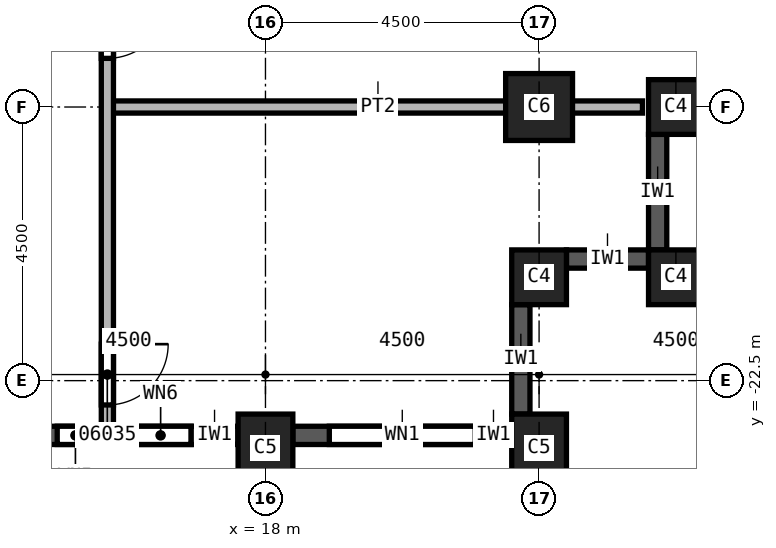
"""IFC4 building model, lengths in metres.
Left out: names, types, materials, properties, quantities, classifications, styles, units other than length and angle.
Written with IfcOpenShell. Run it as: python <this file> out.ifc"""

import sys

from ifc_helpers import new_model, si_unit, direction, frame, frame_2d, origin, origin_2d, place, context, subcontext, project, spatial, rectangle, extrude, element, fill, save


model = new_model("IFC4")
c1 = context("Model", 3, precision=1e-05, world=origin(), true_north=direction((0.0, 1.0)))
c2 = subcontext(c1, "Body", "Model", "MODEL_VIEW")
j1 = project(units=[si_unit("LENGTHUNIT", "METRE"), si_unit("PLANEANGLEUNIT", "RADIAN")], contexts=[c1])
p1 = place(None, origin())
s1 = spatial("IfcSite", under=j1, at=p1, CompositionType="ELEMENT")
p2 = place(p1, origin())
s2 = spatial("IfcBuilding", under=s1, at=p2, CompositionType="ELEMENT")
p3 = place(p2, frame((0.0, 0.0, 126.0)))
s3 = spatial("IfcBuildingStorey", under=s2, at=p3, CompositionType="ELEMENT", Elevation=126.0)
p4 = place(p3, frame((22.5, -18.0, 0.0), z_axis=(0.0, 0.0, 1.0), x_axis=(1.0, 0.0, 0.0)))
e1 = element("IfcColumn", 1, at=p4, inside=s3, PredefinedType="COLUMN", context=c2, shape_type="SweptSolid", body=[
    extrude(rectangle(XDim=1.1, YDim=1.1, at=origin_2d()), origin(), (0.0, 0.0, 1.0), 3.7),
])
for number, where, z_axis, x_axis in (
    (2, (18.0, -23.6, 0.0), (0.0, 0.0, 1.0), (1.0, 0.0, 0.0)),
    (3, (22.5, -23.6, 0.0), (0.0, 0.0, 1.0), (1.0, 0.0, 0.0)),
):
    element("IfcColumn", number, at=place(p3, frame(where, z_axis=z_axis, x_axis=x_axis)), inside=s3, PredefinedType="COLUMN", context=c2, shape_type="SweptSolid", body=[
        extrude(rectangle(XDim=0.9, YDim=1.1, at=origin_2d()), origin(), (0.0, 0.0, 1.0), 3.7),
    ])
for number, where, z_axis, x_axis in (
    (4, (22.5, -20.8, 0.0), (0.0, 0.0, 1.0), (1.0, 0.0, 0.0)),
    (5, (24.75, -20.8, 0.0), (0.0, 0.0, 1.0), (1.0, 0.0, 0.0)),
    (6, (24.75, -18.0, 0.0), (0.0, 0.0, 1.0), (1.0, 0.0, 0.0)),
):
    element("IfcColumn", number, at=place(p3, frame(where, z_axis=z_axis, x_axis=x_axis)), inside=s3, PredefinedType="COLUMN", context=c2, shape_type="SweptSolid", body=[
        extrude(rectangle(XDim=0.9, YDim=0.9, at=origin_2d()), origin(), (0.0, 0.0, 1.0), 3.7),
    ])
p5 = place(p3, frame((13.95, -23.4, 0.0), z_axis=(0.0, 0.0, 1.0), x_axis=(1.0, 0.0, 0.0)))
e7 = element("IfcWall", 7, at=p5, inside=s3, PredefinedType="SOLIDWALL", context=c2, shape_type="SweptSolid", body=[
    extrude(rectangle(XDim=3.6, YDim=0.3, at=frame_2d((1.8, 0.0))), origin(), (0.0, 0.0, 1.0), 3.1),
])
p6 = place(p5, frame((0.625, 0.0, 0.8)))
e8 = element("IfcOpeningElement", 8, at=p6, cuts=e7, PredefinedType="OPENING", context=c2, shape_type="SweptSolid", body=[
    extrude(rectangle(XDim=0.6, YDim=1.95, at=frame_2d((0.3, 0.975))), frame((0.0, 0.15, 0.0), z_axis=(0.0, -1.0, 0.0), x_axis=(1.0, 0.0, 0.0)), (0.0, 0.0, 1.0), 0.3),
])
p7 = place(p5, frame((1.825, 0.0, 0.8)))
e9 = element("IfcOpeningElement", 9, at=p7, cuts=e7, PredefinedType="OPENING", context=c2, shape_type="SweptSolid", body=[
    extrude(rectangle(XDim=1.0, YDim=1.95, at=frame_2d((0.5, 0.975))), frame((0.0, 0.15, 0.0), z_axis=(0.0, -1.0, 0.0), x_axis=(1.0, 0.0, 0.0)), (0.0, 0.0, 1.0), 0.3),
])
p8 = place(p3, frame((18.45, -23.4, 0.0), z_axis=(0.0, 0.0, 1.0), x_axis=(1.0, 0.0, 0.0)))
e10 = element("IfcWall", 10, at=p8, inside=s3, PredefinedType="SOLIDWALL", context=c2, shape_type="SweptSolid", body=[
    extrude(rectangle(XDim=3.6, YDim=0.3, at=frame_2d((1.8, 0.0))), origin(), (0.0, 0.0, 1.0), 3.1),
])
p9 = place(p8, frame((0.6, 0.0, 0.8)))
e11 = element("IfcOpeningElement", 11, at=p9, cuts=e10, PredefinedType="OPENING", context=c2, shape_type="SweptSolid", body=[
    extrude(rectangle(XDim=2.4, YDim=1.95, at=frame_2d((1.2, 0.975))), frame((0.0, 0.15, 0.0), z_axis=(0.0, -1.0, 0.0), x_axis=(1.0, 0.0, 0.0)), (0.0, 0.0, 1.0), 0.3),
])
p10 = place(p3, frame((22.2, -23.05, 0.0), z_axis=(0.0, 0.0, 1.0), x_axis=(0.0, 1.0, 0.0)))
e12 = element("IfcWall", 12, at=p10, inside=s3, PredefinedType="SOLIDWALL", context=c2, shape_type="SweptSolid", body=[
    extrude(rectangle(XDim=1.8, YDim=0.3, at=frame_2d((0.9, 0.0))), origin(), (0.0, 0.0, 1.0), 3.1),
])
p11 = place(p3, frame((22.95, -20.5, 0.0), z_axis=(0.0, 0.0, 1.0), x_axis=(1.0, 0.0, 0.0)))
e13 = element("IfcWall", 13, at=p11, inside=s3, PredefinedType="SOLIDWALL", context=c2, shape_type="SweptSolid", body=[
    extrude(rectangle(XDim=1.35, YDim=0.3, at=frame_2d((0.675, 0.0))), origin(), (0.0, 0.0, 1.0), 3.1),
])
p12 = place(p3, frame((24.45, -20.35, 0.0), z_axis=(0.0, 0.0, 1.0), x_axis=(0.0, 1.0, 0.0)))
e14 = element("IfcWall", 14, at=p12, inside=s3, PredefinedType="SOLIDWALL", context=c2, shape_type="SweptSolid", body=[
    extrude(rectangle(XDim=1.9, YDim=0.3, at=frame_2d((0.95, 0.0))), origin(), (0.0, 0.0, 1.0), 3.1),
])
p13 = place(p3, frame((15.4, -18.0, 0.0), z_axis=(0.0, 0.0, 1.0), x_axis=(1.0, 0.0, 0.0)))
e15 = element("IfcWall", 15, at=p13, inside=s3, PredefinedType="PARTITIONING", context=c2, shape_type="SweptSolid", body=[
    extrude(rectangle(XDim=8.8, YDim=0.2, at=frame_2d((4.4, 0.0))), origin(), (0.0, 0.0, 1.0), 3.7),
])
p14 = place(p3, frame((15.4, -3.65, 0.0), z_axis=(0.0, 0.0, 1.0), x_axis=(0.0, -1.0, 0.0)))
e16 = element("IfcWall", 16, at=p14, inside=s3, PredefinedType="PARTITIONING", context=c2, shape_type="SweptSolid", body=[
    extrude(rectangle(XDim=19.6, YDim=0.2, at=frame_2d((9.8, 0.0))), origin(), (0.0, 0.0, 1.0), 3.7),
])
p15 = place(p14, frame((18.25, 0.0, 0.0)))
e17 = element("IfcOpeningElement", 17, at=p15, cuts=e16, PredefinedType="OPENING", context=c2, shape_type="SweptSolid", body=[
    extrude(rectangle(XDim=1.0, YDim=2.1, at=frame_2d((0.5, 1.05))), frame((0.0, 0.1, 0.0), z_axis=(0.0, -1.0, 0.0), x_axis=(1.0, 0.0, 0.0)), (0.0, 0.0, 1.0), 0.2),
])
p16 = place(p14, frame((12.55, 0.0, 0.0)))
e18 = element("IfcOpeningElement", 18, at=p16, cuts=e16, PredefinedType="OPENING", context=c2, shape_type="SweptSolid", body=[
    extrude(rectangle(XDim=1.0, YDim=2.1, at=frame_2d((0.5, 1.05))), frame((0.0, 0.1, 0.0), z_axis=(0.0, -1.0, 0.0), x_axis=(1.0, 0.0, 0.0)), (0.0, 0.0, 1.0), 0.2),
])
p17 = place(p14, frame((4.45, 0.0, 0.0)))
e19 = element("IfcOpeningElement", 19, at=p17, cuts=e16, PredefinedType="OPENING", context=c2, shape_type="SweptSolid", body=[
    extrude(rectangle(XDim=1.0, YDim=2.1, at=frame_2d((0.5, 1.05))), frame((0.0, 0.1, 0.0), z_axis=(0.0, -1.0, 0.0), x_axis=(1.0, 0.0, 0.0)), (0.0, 0.0, 1.0), 0.2),
])
p18 = place(p9, origin())
e20 = element("IfcWindow", 20, at=p18, inside=s3, PartitioningType="SINGLE_PANEL", PredefinedType="WINDOW", context=c2, shape_type="SweptSolid", body=[
    extrude(rectangle(XDim=2.4, YDim=1.95, at=frame_2d((1.2, 0.975))), frame((0.0, 0.03, 0.0), z_axis=(0.0, -1.0, 0.0), x_axis=(1.0, 0.0, 0.0)), (0.0, 0.0, 1.0), 0.06),
])
fill(e11, e20)
p19 = place(p15, origin())
e21 = element("IfcDoor", 21, at=p19, inside=s3, OperationType="SINGLE_SWING_RIGHT", PredefinedType="DOOR", context=c2, shape_type="SweptSolid", body=[
    extrude(rectangle(XDim=1.0, YDim=2.1, at=frame_2d((0.5, 1.05))), frame((0.0, 0.025, 0.0), z_axis=(0.0, -1.0, 0.0), x_axis=(1.0, 0.0, 0.0)), (0.0, 0.0, 1.0), 0.05),
])
fill(e17, e21)
p20 = place(p16, origin())
e22 = element("IfcDoor", 22, at=p20, inside=s3, OperationType="SINGLE_SWING_LEFT", PredefinedType="DOOR", context=c2, shape_type="SweptSolid", body=[
    extrude(rectangle(XDim=1.0, YDim=2.1, at=frame_2d((0.5, 1.05))), frame((0.0, 0.025, 0.0), z_axis=(0.0, -1.0, 0.0), x_axis=(1.0, 0.0, 0.0)), (0.0, 0.0, 1.0), 0.05),
])
fill(e18, e22)
p21 = place(p6, origin())
e23 = element("IfcWindow", 23, at=p21, inside=s3, PartitioningType="SINGLE_PANEL", PredefinedType="WINDOW", context=c2, shape_type="SweptSolid", body=[
    extrude(rectangle(XDim=0.6, YDim=1.95, at=frame_2d((0.3, 0.975))), frame((0.0, 0.03, 0.0), z_axis=(0.0, -1.0, 0.0), x_axis=(1.0, 0.0, 0.0)), (0.0, 0.0, 1.0), 0.06),
])
fill(e8, e23)
p22 = place(p7, origin())
e24 = element("IfcWindow", 24, at=p22, inside=s3, PartitioningType="SINGLE_PANEL", PredefinedType="WINDOW", context=c2, shape_type="SweptSolid", body=[
    extrude(rectangle(XDim=1.0, YDim=1.95, at=frame_2d((0.5, 0.975))), frame((0.0, 0.03, 0.0), z_axis=(0.0, -1.0, 0.0), x_axis=(1.0, 0.0, 0.0)), (0.0, 0.0, 1.0), 0.06),
])
fill(e9, e24)
save(model, sys.argv[1])
